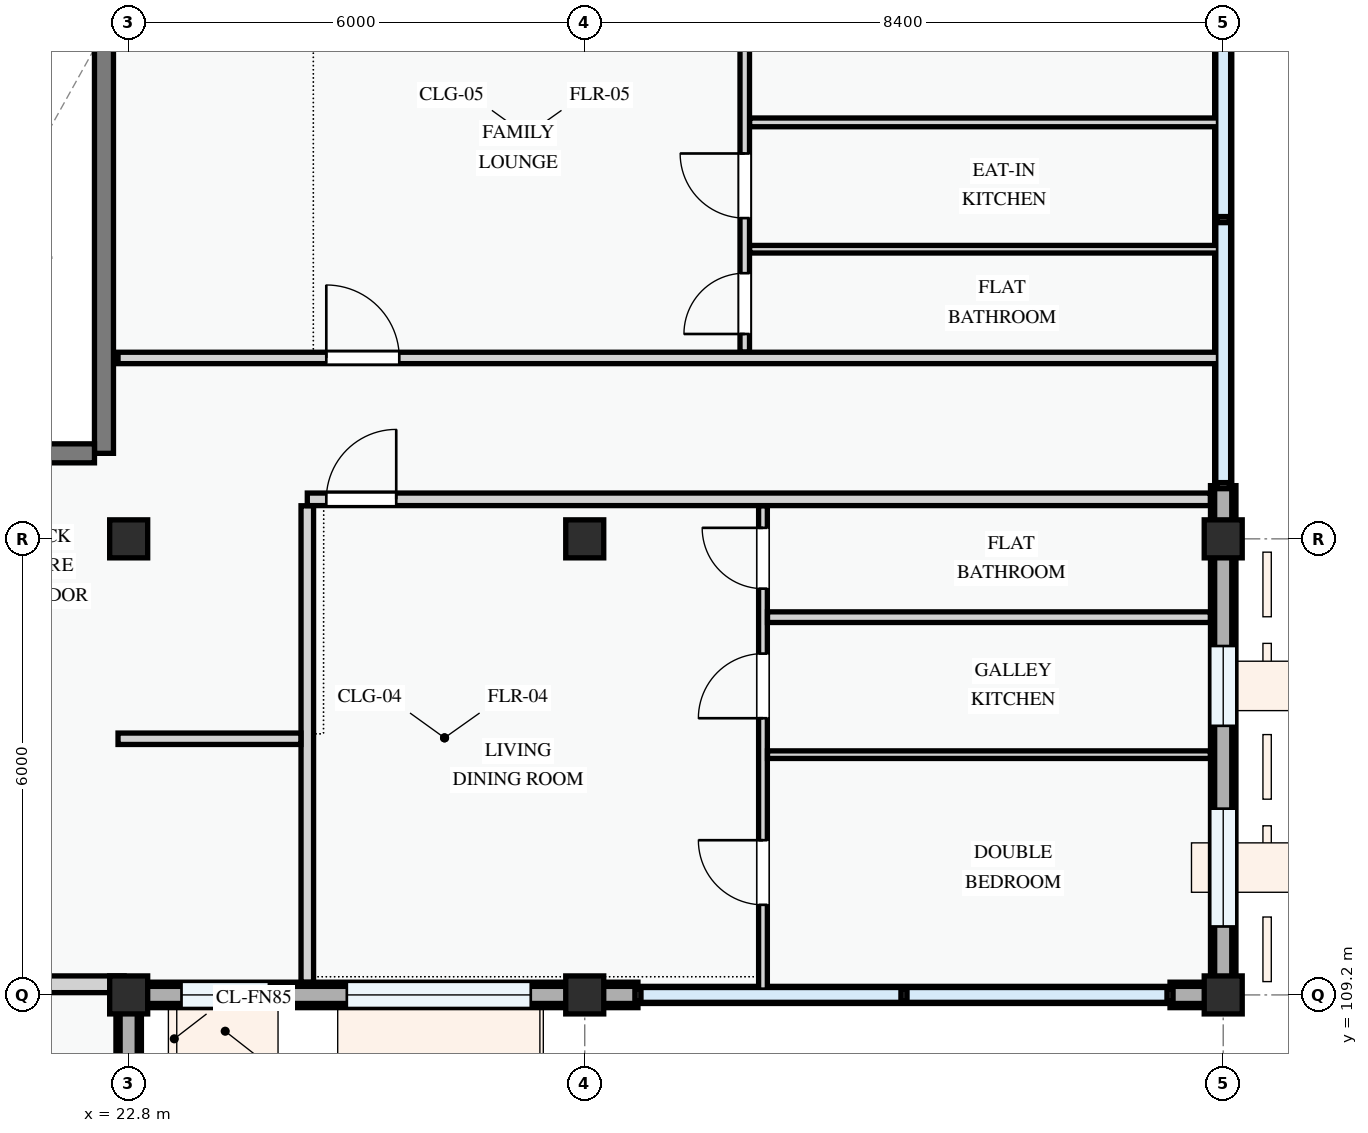
"""IFC4 building model, lengths in metres.
Left out: names, types, materials, properties, quantities, classifications, styles, units other than length and angle.
Written with IfcOpenShell. Run it as: python <this file> out.ifc"""

import sys

from ifc_helpers import new_model, si_unit, direction, frame, frame_2d, origin, origin_2d, place, context, subcontext, project, spatial, rectangle, extrude, element, fill, save


model = new_model("IFC4")
c1 = context("Model", 3, precision=1e-05, world=origin(), true_north=direction((0.0, 1.0)))
c2 = subcontext(c1, "Body", "Model", "MODEL_VIEW")
j1 = project(units=[si_unit("LENGTHUNIT", "METRE"), si_unit("PLANEANGLEUNIT", "RADIAN")], contexts=[c1])
p1 = place(None, origin())
s1 = spatial("IfcSite", under=j1, at=p1, CompositionType="ELEMENT")
p2 = place(p1, origin())
s2 = spatial("IfcBuilding", under=s1, at=p2, CompositionType="ELEMENT")
p3 = place(p2, frame((0.0, 0.0, 51.0)))
s3 = spatial("IfcBuildingStorey", under=s2, at=p3, CompositionType="ELEMENT", Elevation=51.0)
for number, where, z_axis, x_axis in (
    (1, (22.8, 109.2, 0.0), (0.0, 0.0, 1.0), (1.0, 0.0, 0.0)),
    (2, (22.8, 115.2, 0.0), (0.0, 0.0, 1.0), (1.0, 0.0, 0.0)),
    (3, (28.8, 109.2, 0.0), (0.0, 0.0, 1.0), (1.0, 0.0, 0.0)),
    (4, (28.8, 115.2, 0.0), (0.0, 0.0, 1.0), (1.0, 0.0, 0.0)),
    (5, (37.2, 109.2, 0.0), (0.0, 0.0, 1.0), (1.0, 0.0, 0.0)),
    (6, (37.2, 115.2, 0.0), (0.0, 0.0, 1.0), (1.0, 0.0, 0.0)),
):
    element("IfcColumn", number, at=place(p3, frame(where, z_axis=z_axis, x_axis=x_axis)), inside=s3, PredefinedType="COLUMN", context=c2, shape_type="SweptSolid", body=[
        extrude(rectangle(XDim=0.5, YDim=0.5, at=origin_2d()), origin(), (0.0, 0.0, 1.0), 3.3),
    ])
p4 = place(p3, frame((22.8, 109.2, 0.0), z_axis=(0.0, 0.0, 1.0), x_axis=(1.0, 0.0, 0.0)))
e7 = element("IfcWall", 7, at=p4, inside=s3, PredefinedType="STANDARD", context=c2, shape_type="SweptSolid", body=[
    extrude(rectangle(XDim=6.0, YDim=0.335, at=frame_2d((3.0, 0.0))), origin(), (0.0, 0.0, 1.0), 2.545),
])
p5 = place(p4, frame((0.695, 0.0, 0.78)))
e8 = element("IfcOpeningElement", 8, at=p5, cuts=e7, PredefinedType="OPENING", context=c2, shape_type="SweptSolid", body=[
    extrude(rectangle(XDim=1.15, YDim=1.25, at=frame_2d((0.575, 0.625))), frame((0.0, 0.177, 0.0), z_axis=(0.0, -1.0, 0.0), x_axis=(1.0, 0.0, 0.0)), (0.0, 0.0, 1.0), 0.355),
])
p6 = place(p4, frame((2.87, 0.0, 0.78)))
e9 = element("IfcOpeningElement", 9, at=p6, cuts=e7, PredefinedType="OPENING", context=c2, shape_type="SweptSolid", body=[
    extrude(rectangle(XDim=2.42, YDim=1.52, at=frame_2d((1.21, 0.76))), frame((0.0, 0.177, 0.0), z_axis=(0.0, -1.0, 0.0), x_axis=(1.0, 0.0, 0.0)), (0.0, 0.0, 1.0), 0.355),
])
p7 = place(p3, frame((28.8, 109.2, 0.0), z_axis=(0.0, 0.0, 1.0), x_axis=(1.0, 0.0, 0.0)))
e10 = element("IfcWall", 10, at=p7, inside=s3, PredefinedType="STANDARD", context=c2, shape_type="SweptSolid", body=[
    extrude(rectangle(XDim=0.7, YDim=0.335, at=frame_2d((0.35, 0.0))), origin(), (0.0, 0.0, 1.0), 2.395),
])
p8 = place(p3, frame((36.5, 109.2, 0.0), z_axis=(0.0, 0.0, 1.0), x_axis=(1.0, 0.0, 0.0)))
e11 = element("IfcWall", 11, at=p8, inside=s3, PredefinedType="STANDARD", context=c2, shape_type="SweptSolid", body=[
    extrude(rectangle(XDim=0.531, YDim=0.335, at=frame_2d((0.265, 0.0))), origin(), (0.0, 0.0, 1.0), 2.395),
])
p9 = place(p3, frame((37.2, 109.2, 0.0), z_axis=(0.0, 0.0, 1.0), x_axis=(0.0, 1.0, 0.0)))
e12 = element("IfcWall", 12, at=p9, inside=s3, PredefinedType="STANDARD", context=c2, shape_type="SweptSolid", body=[
    extrude(rectangle(XDim=6.0, YDim=0.335, at=frame_2d((3.0, 0.0))), origin(), (0.0, 0.0, 1.0), 2.595),
])
p10 = place(p9, frame((0.9, 0.0, 0.78)))
e13 = element("IfcOpeningElement", 13, at=p10, cuts=e12, PredefinedType="OPENING", context=c2, shape_type="SweptSolid", body=[
    extrude(rectangle(XDim=1.55, YDim=1.4, at=frame_2d((0.775, 0.7))), frame((0.0, 0.177, 0.0), z_axis=(0.0, -1.0, 0.0), x_axis=(1.0, 0.0, 0.0)), (0.0, 0.0, 1.0), 0.355),
])
p11 = place(p9, frame((3.54, 0.0, 0.78)))
e14 = element("IfcOpeningElement", 14, at=p11, cuts=e12, PredefinedType="OPENING", context=c2, shape_type="SweptSolid", body=[
    extrude(rectangle(XDim=1.05, YDim=1.2, at=frame_2d((0.525, 0.6))), frame((0.0, 0.177, 0.0), z_axis=(0.0, -1.0, 0.0), x_axis=(1.0, 0.0, 0.0)), (0.0, 0.0, 1.0), 0.355),
])
p12 = place(p3, frame((37.2, 115.2, 0.0), z_axis=(0.0, 0.0, 1.0), x_axis=(0.0, 1.0, 0.0)))
e15 = element("IfcWall", 15, at=p12, inside=s3, PredefinedType="STANDARD", context=c2, shape_type="SweptSolid", body=[
    extrude(rectangle(XDim=0.7, YDim=0.335, at=frame_2d((0.35, 0.0))), origin(), (0.0, 0.0, 1.0), 2.445),
])
p13 = place(p3, frame((22.8, 100.8, 0.0), z_axis=(0.0, 0.0, 1.0), x_axis=(0.0, 1.0, 0.0)))
e16 = element("IfcWall", 16, at=p13, inside=s3, PredefinedType="STANDARD", context=c2, shape_type="SweptSolid", body=[
    extrude(rectangle(XDim=8.4, YDim=0.335, at=frame_2d((4.2, 0.0))), origin(), (0.0, 0.0, 1.0), 2.445),
])
p14 = place(p13, frame((0.495, 0.0, 0.78)))
e17 = element("IfcOpeningElement", 17, at=p14, cuts=e16, PredefinedType="OPENING", context=c2, shape_type="SweptSolid", body=[
    extrude(rectangle(XDim=1.1, YDim=1.3, at=frame_2d((0.55, 0.65))), frame((0.0, 0.177, 0.0), z_axis=(0.0, -1.0, 0.0), x_axis=(1.0, 0.0, 0.0)), (0.0, 0.0, 1.0), 0.355),
])
p15 = place(p13, frame((2.887, 0.0, 0.78)))
e18 = element("IfcOpeningElement", 18, at=p15, cuts=e16, PredefinedType="OPENING", context=c2, shape_type="SweptSolid", body=[
    extrude(rectangle(XDim=1.25, YDim=1.45, at=frame_2d((0.625, 0.725))), frame((0.0, 0.177, 0.0), z_axis=(0.0, -1.0, 0.0), x_axis=(1.0, 0.0, 0.0)), (0.0, 0.0, 1.0), 0.355),
])
p16 = place(p13, frame((5.787, 0.0, 0.78)))
e19 = element("IfcOpeningElement", 19, at=p16, cuts=e16, PredefinedType="OPENING", context=c2, shape_type="SweptSolid", body=[
    extrude(rectangle(XDim=1.62, YDim=1.38, at=frame_2d((0.81, 0.69))), frame((0.0, 0.177, 0.0), z_axis=(0.0, -1.0, 0.0), x_axis=(1.0, 0.0, 0.0)), (0.0, 0.0, 1.0), 0.355),
])
p17 = place(p3, frame((22.8, 109.2, 3.3), z_axis=(0.0, 0.0, 1.0), x_axis=(1.0, 0.0, 0.0)))
e20 = element("IfcWall", 20, at=p17, inside=s3, PredefinedType="PARAPET", context=c2, shape_type="SweptSolid", body=[
    extrude(rectangle(XDim=14.4, YDim=0.225, at=frame_2d((7.2, 0.0))), origin(), (0.0, 0.0, 1.0), 1.15),
])
p18 = place(p3, frame((37.2, 109.2, 3.3), z_axis=(0.0, 0.0, 1.0), x_axis=(0.0, 1.0, 0.0)))
e21 = element("IfcWall", 21, at=p18, inside=s3, PredefinedType="PARAPET", context=c2, shape_type="SweptSolid", body=[
    extrude(rectangle(XDim=14.4, YDim=0.225, at=frame_2d((7.2, 0.0))), origin(), (0.0, 0.0, 1.0), 1.15),
])
p19 = place(p3, frame((22.8, 86.4, 3.3), z_axis=(0.0, 0.0, 1.0), x_axis=(0.0, 1.0, 0.0)))
e22 = element("IfcWall", 22, at=p19, inside=s3, PredefinedType="PARAPET", context=c2, shape_type="SweptSolid", body=[
    extrude(rectangle(XDim=22.8, YDim=0.225, at=frame_2d((11.4, 0.0))), origin(), (0.0, 0.0, 1.0), 1.15),
])
p20 = place(p3, frame((22.475, 123.25, 0.0), z_axis=(0.0, 0.0, 1.0), x_axis=(0.0, -1.0, 0.0)))
e23 = element("IfcWall", 23, at=p20, inside=s3, PredefinedType="SHEAR", context=c2, shape_type="SweptSolid", body=[
    extrude(rectangle(XDim=6.925, YDim=0.25, at=frame_2d((3.462, 0.0))), origin(), (0.0, 0.0, 1.0), 3.0),
])
p21 = place(p3, frame((8.85, 116.325, 0.0), z_axis=(0.0, 0.0, 1.0), x_axis=(1.0, 0.0, 0.0)))
e24 = element("IfcWall", 24, at=p21, inside=s3, PredefinedType="SHEAR", context=c2, shape_type="SweptSolid", body=[
    extrude(rectangle(XDim=13.5, YDim=0.25, at=frame_2d((6.75, 0.0))), origin(), (0.0, 0.0, 1.0), 3.0),
])
p22 = place(p21, frame((6.2, 0.0, 0.0)))
e25 = element("IfcOpeningElement", 25, at=p22, cuts=e24, PredefinedType="OPENING", context=c2, shape_type="SweptSolid", body=[
    extrude(rectangle(XDim=1.1, YDim=2.15, at=frame_2d((0.55, 1.075))), frame((0.0, 0.135, 0.0), z_axis=(0.0, -1.0, 0.0), x_axis=(1.0, 0.0, 0.0)), (0.0, 0.0, 1.0), 0.27),
])
p23 = place(p3, frame((25.15, 109.369, 0.0), z_axis=(0.0, 0.0, 1.0), x_axis=(0.0, 1.0, 0.0)))
e26 = element("IfcWall", 26, at=p23, inside=s3, PredefinedType="PARTITIONING", context=c2, shape_type="SweptSolid", body=[
    extrude(rectangle(XDim=6.266, YDim=0.165, at=frame_2d((3.133, 0.0))), origin(), (0.0, 0.0, 1.0), 3.0),
])
p24 = place(p3, frame((22.66, 112.57, 0.0), z_axis=(0.0, 0.0, 1.0), x_axis=(1.0, 0.0, 0.0)))
e27 = element("IfcWall", 27, at=p24, inside=s3, PredefinedType="PARTITIONING", context=c2, shape_type="SweptSolid", body=[
    extrude(rectangle(XDim=2.406, YDim=0.15, at=frame_2d((1.203, 0.0))), origin(), (0.0, 0.0, 1.0), 3.0),
])
p25 = place(p3, frame((31.145, 109.26, 0.0), z_axis=(0.0, 0.0, 1.0), x_axis=(0.0, 1.0, 0.0)))
e28 = element("IfcWall", 28, at=p25, inside=s3, PredefinedType="PARTITIONING", context=c2, shape_type="SweptSolid", body=[
    extrude(rectangle(XDim=6.375, YDim=0.115, at=frame_2d((3.188, 0.0))), origin(), (0.0, 0.0, 1.0), 3.0),
])
p26 = place(p25, frame((1.125, 0.0, 0.0)))
e29 = element("IfcOpeningElement", 29, at=p26, cuts=e28, PredefinedType="OPENING", context=c2, shape_type="SweptSolid", body=[
    extrude(rectangle(XDim=0.85, YDim=2.1, at=frame_2d((0.425, 1.05))), frame((0.0, 0.067, 0.0), z_axis=(0.0, -1.0, 0.0), x_axis=(1.0, 0.0, 0.0)), (0.0, 0.0, 1.0), 0.135),
])
p27 = place(p25, frame((3.58, 0.0, 0.0)))
e30 = element("IfcOpeningElement", 30, at=p27, cuts=e28, PredefinedType="OPENING", context=c2, shape_type="SweptSolid", body=[
    extrude(rectangle(XDim=0.85, YDim=2.1, at=frame_2d((0.425, 1.05))), frame((0.0, 0.067, 0.0), z_axis=(0.0, -1.0, 0.0), x_axis=(1.0, 0.0, 0.0)), (0.0, 0.0, 1.0), 0.135),
])
p28 = place(p25, frame((5.285, 0.0, 0.0)))
e31 = element("IfcOpeningElement", 31, at=p28, cuts=e28, PredefinedType="OPENING", context=c2, shape_type="SweptSolid", body=[
    extrude(rectangle(XDim=0.8, YDim=2.1, at=frame_2d((0.4, 1.05))), frame((0.0, 0.067, 0.0), z_axis=(0.0, -1.0, 0.0), x_axis=(1.0, 0.0, 0.0)), (0.0, 0.0, 1.0), 0.135),
])
p29 = place(p3, frame((31.205, 112.361, 0.0), z_axis=(0.0, 0.0, 1.0), x_axis=(1.0, 0.0, 0.0)))
e32 = element("IfcWall", 32, at=p29, inside=s3, PredefinedType="PARTITIONING", context=c2, shape_type="SweptSolid", body=[
    extrude(rectangle(XDim=5.826, YDim=0.1, at=frame_2d((2.913, 0.0))), origin(), (0.0, 0.0, 1.0), 3.0),
])
p30 = place(p3, frame((31.205, 114.17, 0.0), z_axis=(0.0, 0.0, 1.0), x_axis=(1.0, 0.0, 0.0)))
e33 = element("IfcWall", 33, at=p30, inside=s3, PredefinedType="PARTITIONING", context=c2, shape_type="SweptSolid", body=[
    extrude(rectangle(XDim=5.826, YDim=0.14, at=frame_2d((2.913, 0.0))), origin(), (0.0, 0.0, 1.0), 3.0),
])
p31 = place(p3, frame((30.905, 117.657, 0.0), z_axis=(0.0, 0.0, 1.0), x_axis=(0.0, 1.0, 0.0)))
e34 = element("IfcWall", 34, at=p31, inside=s3, PredefinedType="PARTITIONING", context=c2, shape_type="SweptSolid", body=[
    extrude(rectangle(XDim=5.773, YDim=0.125, at=frame_2d((2.887, 0.0))), origin(), (0.0, 0.0, 1.0), 3.0),
])
p32 = place(p31, frame((0.238, 0.0, 0.0)))
e35 = element("IfcOpeningElement", 35, at=p32, cuts=e34, PredefinedType="OPENING", context=c2, shape_type="SweptSolid", body=[
    extrude(rectangle(XDim=0.8, YDim=2.1, at=frame_2d((0.4, 1.05))), frame((0.0, 0.073, 0.0), z_axis=(0.0, -1.0, 0.0), x_axis=(1.0, 0.0, 0.0)), (0.0, 0.0, 1.0), 0.145),
])
p33 = place(p31, frame((1.763, 0.0, 0.0)))
e36 = element("IfcOpeningElement", 36, at=p33, cuts=e34, PredefinedType="OPENING", context=c2, shape_type="SweptSolid", body=[
    extrude(rectangle(XDim=0.85, YDim=2.1, at=frame_2d((0.425, 1.05))), frame((0.0, 0.073, 0.0), z_axis=(0.0, -1.0, 0.0), x_axis=(1.0, 0.0, 0.0)), (0.0, 0.0, 1.0), 0.145),
])
p34 = place(p31, frame((4.028, 0.0, 0.0)))
e37 = element("IfcOpeningElement", 37, at=p34, cuts=e34, PredefinedType="OPENING", context=c2, shape_type="SweptSolid", body=[
    extrude(rectangle(XDim=0.85, YDim=2.1, at=frame_2d((0.425, 1.05))), frame((0.0, 0.073, 0.0), z_axis=(0.0, -1.0, 0.0), x_axis=(1.0, 0.0, 0.0)), (0.0, 0.0, 1.0), 0.145),
])
p35 = place(p3, frame((30.97, 120.679, 0.0), z_axis=(0.0, 0.0, 1.0), x_axis=(1.0, 0.0, 0.0)))
e38 = element("IfcWall", 38, at=p35, inside=s3, PredefinedType="PARTITIONING", context=c2, shape_type="SweptSolid", body=[
    extrude(rectangle(XDim=6.17, YDim=0.115, at=frame_2d((3.085, 0.0))), origin(), (0.0, 0.0, 1.0), 3.0),
])
p36 = place(p3, frame((30.97, 119.01, 0.0), z_axis=(0.0, 0.0, 1.0), x_axis=(1.0, 0.0, 0.0)))
e39 = element("IfcWall", 39, at=p36, inside=s3, PredefinedType="PARTITIONING", context=c2, shape_type="SweptSolid", body=[
    extrude(rectangle(XDim=6.17, YDim=0.1, at=frame_2d((3.085, 0.0))), origin(), (0.0, 0.0, 1.0), 3.0),
])
p37 = place(p3, frame((25.15, 115.72, 0.0), z_axis=(0.0, 0.0, 1.0), x_axis=(1.0, 0.0, 0.0)))
e40 = element("IfcWall", 40, at=p37, inside=s3, PredefinedType="PARTITIONING", context=c2, shape_type="SweptSolid", body=[
    extrude(rectangle(XDim=11.881, YDim=0.165, at=frame_2d((5.94, 0.0))), origin(), (0.0, 0.0, 1.0), 3.0),
])
p38 = place(p37, frame((0.25, 0.0, 0.0)))
e41 = element("IfcOpeningElement", 41, at=p38, cuts=e40, PredefinedType="OPENING", context=c2, shape_type="SweptSolid", body=[
    extrude(rectangle(XDim=0.92, YDim=2.1, at=frame_2d((0.46, 1.05))), frame((0.0, 0.093, 0.0), z_axis=(0.0, -1.0, 0.0), x_axis=(1.0, 0.0, 0.0)), (0.0, 0.0, 1.0), 0.185),
])
p39 = place(p3, frame((22.66, 117.58, 0.0), z_axis=(0.0, 0.0, 1.0), x_axis=(1.0, 0.0, 0.0)))
e42 = element("IfcWall", 42, at=p39, inside=s3, PredefinedType="PARTITIONING", context=c2, shape_type="SweptSolid", body=[
    extrude(rectangle(XDim=14.48, YDim=0.15, at=frame_2d((7.24, 0.0))), origin(), (0.0, 0.0, 1.0), 3.0),
])
p40 = place(p39, frame((2.74, 0.0, 0.0)))
e43 = element("IfcOpeningElement", 43, at=p40, cuts=e42, PredefinedType="OPENING", context=c2, shape_type="SweptSolid", body=[
    extrude(rectangle(XDim=0.96, YDim=2.12, at=frame_2d((0.48, 1.06))), frame((0.0, 0.085, 0.0), z_axis=(0.0, -1.0, 0.0), x_axis=(1.0, 0.0, 0.0)), (0.0, 0.0, 1.0), 0.17),
])
p41 = place(p3, frame((18.057, 109.34, 0.0), z_axis=(0.0, 0.0, 1.0), x_axis=(1.0, 0.0, 0.0)))
e44 = element("IfcWall", 44, at=p41, inside=s3, PredefinedType="PARTITIONING", context=c2, shape_type="SweptSolid", body=[
    extrude(rectangle(XDim=4.683, YDim=0.22, at=frame_2d((2.342, 0.0))), origin(), (0.0, 0.0, 1.0), 2.395),
])
p42 = place(p5, origin())
e45 = element("IfcWindow", 45, at=p42, inside=s3, PartitioningType="SINGLE_PANEL", PredefinedType="WINDOW", context=c2, shape_type="SweptSolid", body=[
    extrude(rectangle(XDim=1.15, YDim=1.25, at=frame_2d((0.575, 0.625))), frame((0.0, 0.03, 0.0), z_axis=(0.0, -1.0, 0.0), x_axis=(1.0, 0.0, 0.0)), (0.0, 0.0, 1.0), 0.06),
])
fill(e8, e45)
p43 = place(p6, origin())
e46 = element("IfcWindow", 46, at=p43, inside=s3, PartitioningType="DOUBLE_PANEL_VERTICAL", PredefinedType="WINDOW", context=c2, shape_type="SweptSolid", body=[
    extrude(rectangle(XDim=2.42, YDim=1.52, at=frame_2d((1.21, 0.76))), frame((0.0, 0.03, 0.0), z_axis=(0.0, -1.0, 0.0), x_axis=(1.0, 0.0, 0.0)), (0.0, 0.0, 1.0), 0.06),
])
fill(e9, e46)
p44 = place(p10, origin())
e47 = element("IfcWindow", 47, at=p44, inside=s3, PartitioningType="SINGLE_PANEL", PredefinedType="WINDOW", context=c2, shape_type="SweptSolid", body=[
    extrude(rectangle(XDim=1.55, YDim=1.4, at=frame_2d((0.775, 0.7))), frame((0.0, 0.03, 0.0), z_axis=(0.0, -1.0, 0.0), x_axis=(1.0, 0.0, 0.0)), (0.0, 0.0, 1.0), 0.06),
])
fill(e13, e47)
p45 = place(p11, origin())
e48 = element("IfcWindow", 48, at=p45, inside=s3, PartitioningType="SINGLE_PANEL", PredefinedType="WINDOW", context=c2, shape_type="SweptSolid", body=[
    extrude(rectangle(XDim=1.05, YDim=1.2, at=frame_2d((0.525, 0.6))), frame((0.0, 0.03, 0.0), z_axis=(0.0, -1.0, 0.0), x_axis=(1.0, 0.0, 0.0)), (0.0, 0.0, 1.0), 0.06),
])
fill(e14, e48)
p46 = place(p26, origin())
e49 = element("IfcDoor", 49, at=p46, inside=s3, OperationType="SINGLE_SWING_RIGHT", PredefinedType="DOOR", context=c2, shape_type="SweptSolid", body=[
    extrude(rectangle(XDim=0.85, YDim=2.1, at=frame_2d((0.425, 1.05))), frame((0.0, 0.025, 0.0), z_axis=(0.0, -1.0, 0.0), x_axis=(1.0, 0.0, 0.0)), (0.0, 0.0, 1.0), 0.05),
])
fill(e29, e49)
p47 = place(p27, origin())
e50 = element("IfcDoor", 50, at=p47, inside=s3, OperationType="SINGLE_SWING_LEFT", PredefinedType="DOOR", context=c2, shape_type="SweptSolid", body=[
    extrude(rectangle(XDim=0.85, YDim=2.1, at=frame_2d((0.425, 1.05))), frame((0.0, 0.025, 0.0), z_axis=(0.0, -1.0, 0.0), x_axis=(1.0, 0.0, 0.0)), (0.0, 0.0, 1.0), 0.05),
])
fill(e30, e50)
p48 = place(p28, origin())
e51 = element("IfcDoor", 51, at=p48, inside=s3, OperationType="SINGLE_SWING_RIGHT", PredefinedType="DOOR", context=c2, shape_type="SweptSolid", body=[
    extrude(rectangle(XDim=0.8, YDim=2.1, at=frame_2d((0.4, 1.05))), frame((0.0, 0.025, 0.0), z_axis=(0.0, -1.0, 0.0), x_axis=(1.0, 0.0, 0.0)), (0.0, 0.0, 1.0), 0.05),
])
fill(e31, e51)
p49 = place(p32, origin())
e52 = element("IfcDoor", 52, at=p49, inside=s3, OperationType="SINGLE_SWING_LEFT", PredefinedType="DOOR", context=c2, shape_type="SweptSolid", body=[
    extrude(rectangle(XDim=0.8, YDim=2.1, at=frame_2d((0.4, 1.05))), frame((0.0, 0.025, 0.0), z_axis=(0.0, -1.0, 0.0), x_axis=(1.0, 0.0, 0.0)), (0.0, 0.0, 1.0), 0.05),
])
fill(e35, e52)
p50 = place(p33, origin())
e53 = element("IfcDoor", 53, at=p50, inside=s3, OperationType="SINGLE_SWING_RIGHT", PredefinedType="DOOR", context=c2, shape_type="SweptSolid", body=[
    extrude(rectangle(XDim=0.85, YDim=2.1, at=frame_2d((0.425, 1.05))), frame((0.0, 0.025, 0.0), z_axis=(0.0, -1.0, 0.0), x_axis=(1.0, 0.0, 0.0)), (0.0, 0.0, 1.0), 0.05),
])
fill(e36, e53)
p51 = place(p38, origin())
e54 = element("IfcDoor", 54, at=p51, inside=s3, OperationType="SINGLE_SWING_RIGHT", PredefinedType="DOOR", context=c2, shape_type="SweptSolid", body=[
    extrude(rectangle(XDim=0.92, YDim=2.1, at=frame_2d((0.46, 1.05))), frame((0.0, 0.025, 0.0), z_axis=(0.0, -1.0, 0.0), x_axis=(1.0, 0.0, 0.0)), (0.0, 0.0, 1.0), 0.05),
])
fill(e41, e54)
p52 = place(p40, origin())
e55 = element("IfcDoor", 55, at=p52, inside=s3, OperationType="SINGLE_SWING_LEFT", PredefinedType="DOOR", context=c2, shape_type="SweptSolid", body=[
    extrude(rectangle(XDim=0.96, YDim=2.12, at=frame_2d((0.48, 1.06))), frame((0.0, 0.025, 0.0), z_axis=(0.0, -1.0, 0.0), x_axis=(1.0, 0.0, 0.0)), (0.0, 0.0, 1.0), 0.05),
])
fill(e43, e55)
save(model, sys.argv[1])
